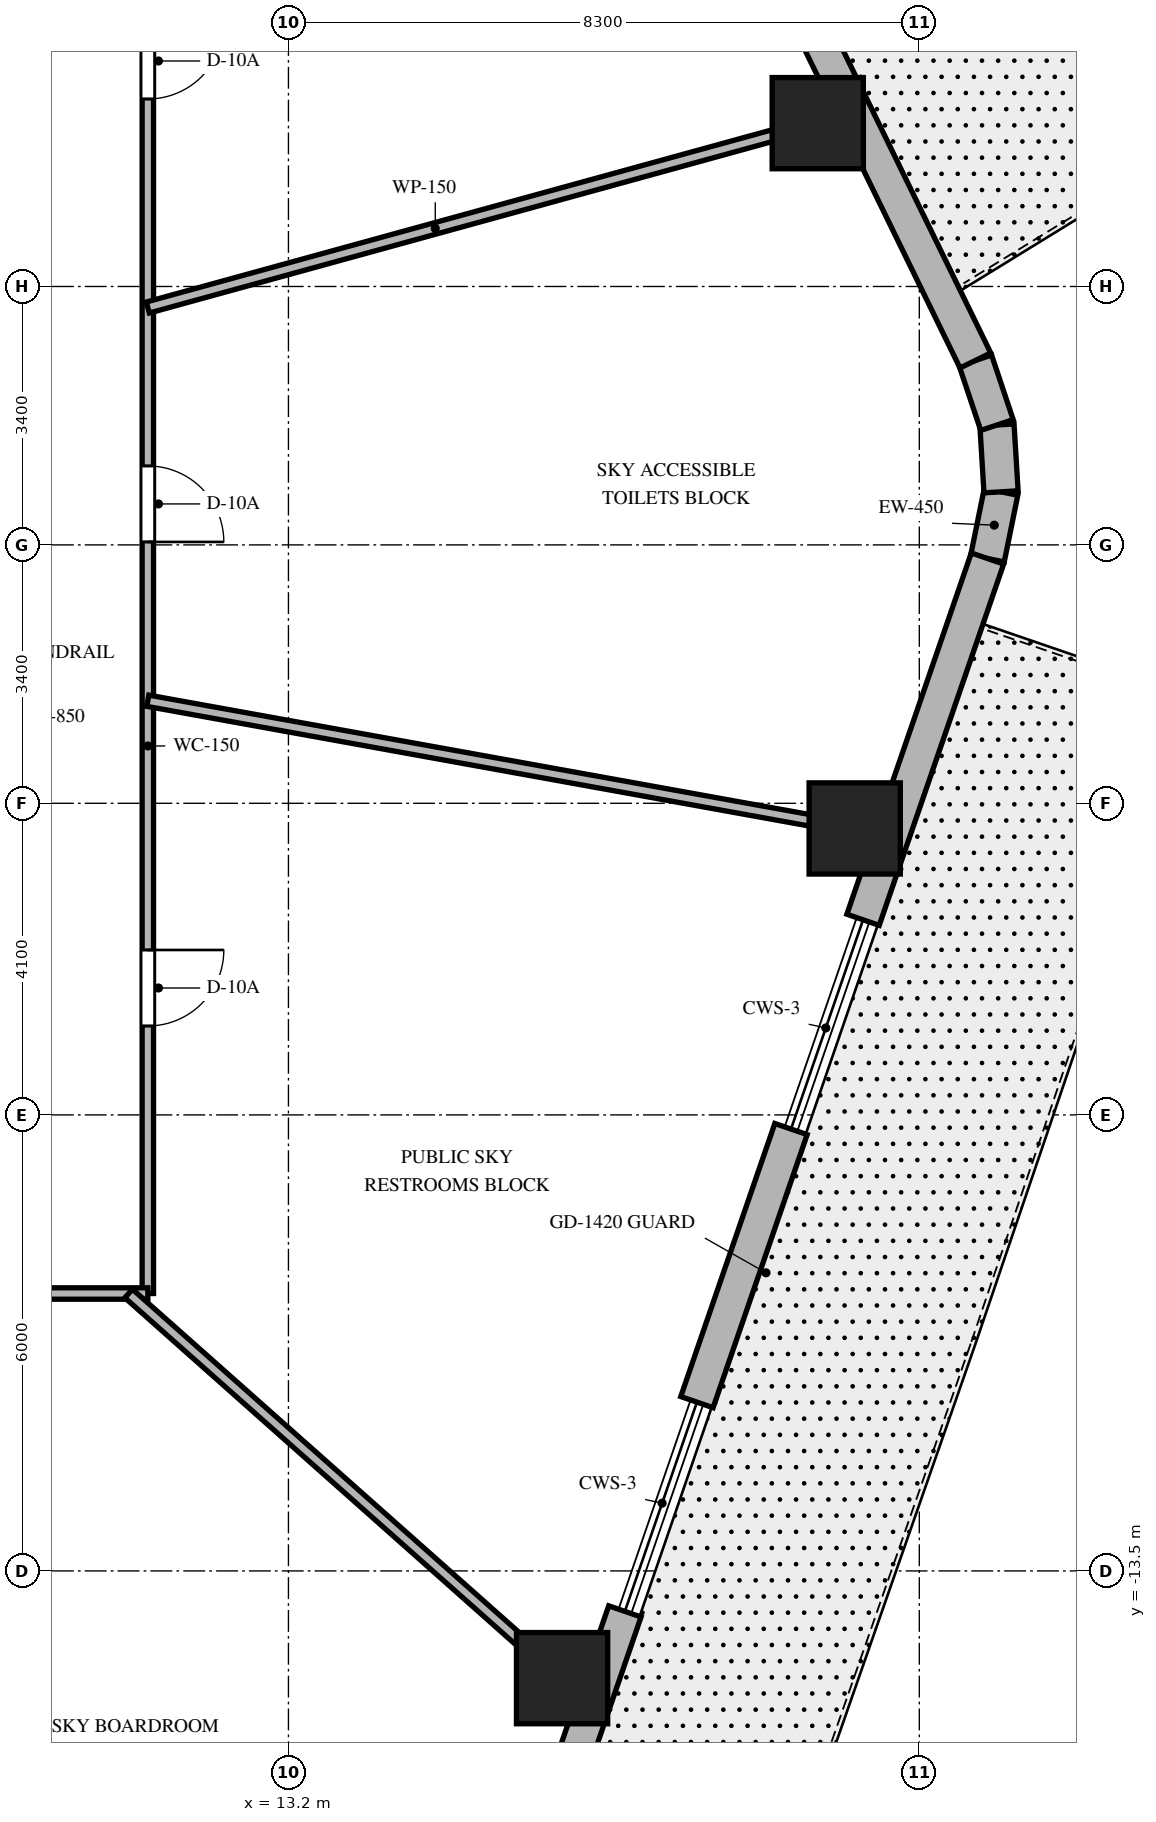
"""IFC4 building model, lengths in metres.
Left out: names, types, materials, properties, quantities, classifications, styles, units other than length and angle.
Written with IfcOpenShell. Run it as: python <this file> out.ifc"""

import sys

from ifc_helpers import new_model, si_unit, direction, frame, frame_2d, origin, origin_2d, place, context, subcontext, project, spatial, rectangle, extrude, element, fill, save


model = new_model("IFC4")
c1 = context("Model", 3, precision=1e-05, world=origin(), true_north=direction((0.0, 1.0)))
c2 = subcontext(c1, "Body", "Model", "MODEL_VIEW")
j1 = project(units=[si_unit("LENGTHUNIT", "METRE"), si_unit("PLANEANGLEUNIT", "RADIAN")], contexts=[c1])
p1 = place(None, origin())
s1 = spatial("IfcSite", under=j1, at=p1, CompositionType="ELEMENT")
p2 = place(p1, origin())
s2 = spatial("IfcBuilding", under=s1, at=p2, CompositionType="ELEMENT")
p3 = place(p2, frame((0.0, 0.0, 139.5)))
s3 = spatial("IfcBuildingStorey", under=s2, at=p3, CompositionType="ELEMENT", Elevation=139.5)
for number, where, z_axis, x_axis in (
    (1, (16.8, -14.911, 0.0), (0.0, 0.0, 1.0), (1.0, 0.0, 0.0)),
    (2, (20.65, -3.731, 0.0), (0.0, 0.0, 1.0), (1.0, 0.0, 0.0)),
    (3, (20.164, 5.549, 0.0), (0.0, 0.0, 1.0), (1.0, 0.0, 0.0)),
):
    element("IfcColumn", number, at=place(p3, frame(where, z_axis=z_axis, x_axis=x_axis)), inside=s3, PredefinedType="COLUMN", context=c2, shape_type="SweptSolid", body=[
        extrude(rectangle(XDim=1.2, YDim=1.2, at=origin_2d()), origin(), (0.0, 0.0, 1.0), 4.8),
    ])
p4 = place(p3, frame((22.397, -0.179, 0.0), z_axis=(0.0, 0.0, 1.0), x_axis=(0.199313589404, 0.979935759669, 0.0)))
e4 = element("IfcWall", 4, at=p4, inside=s3, PredefinedType="SOLIDWALL", context=c2, shape_type="SweptSolid", body=[
    extrude(rectangle(XDim=0.896, YDim=0.45, at=frame_2d((0.448, 0.0))), origin(), (0.0, 0.0, 1.0), 4.5),
])
p5 = place(p3, frame((22.575, 0.698, 0.0), z_axis=(0.0, 0.0, 1.0), x_axis=(-0.060980441946, 0.998138961117, 0.0)))
e5 = element("IfcWall", 5, at=p5, inside=s3, PredefinedType="SOLIDWALL", context=c2, shape_type="SweptSolid", body=[
    extrude(rectangle(XDim=0.881, YDim=0.45, at=frame_2d((0.44, 0.0))), origin(), (0.0, 0.0, 1.0), 4.5),
])
p6 = place(p3, frame((22.522, 1.577, 0.0), z_axis=(0.0, 0.0, 1.0), x_axis=(-0.317372694837, 0.948300887151, 0.0)))
e6 = element("IfcWall", 6, at=p6, inside=s3, PredefinedType="SOLIDWALL", context=c2, shape_type="SweptSolid", body=[
    extrude(rectangle(XDim=0.896, YDim=0.45, at=frame_2d((0.448, 0.0))), origin(), (0.0, 0.0, 1.0), 4.5),
])
p7 = place(p3, frame((15.992, -18.777, 0.0), z_axis=(0.0, 0.0, 1.0), x_axis=(0.325626313688, 0.945498547769, 0.0)))
e7 = element("IfcWall", 7, at=p7, inside=s3, PredefinedType="SOLIDWALL", context=c2, shape_type="SweptSolid", body=[
    extrude(rectangle(XDim=5.018, YDim=0.45, at=frame_2d((2.509, 0.0))), origin(), (0.0, 0.0, 1.0), 4.5),
])
p8 = place(p7, frame((2.009, 0.0, 0.0)))
e8 = element("IfcOpeningElement", 8, at=p8, cuts=e7, PredefinedType="OPENING", context=c2, shape_type="SweptSolid", body=[
    extrude(rectangle(XDim=1.0, YDim=2.15, at=frame_2d((0.5, 1.075))), frame((0.0, 0.235, 0.0), z_axis=(0.0, -1.0, 0.0), x_axis=(1.0, 0.0, 0.0)), (0.0, 0.0, 1.0), 0.47),
])
p9 = place(p3, frame((18.574, -11.279, 0.0), z_axis=(0.0, 0.0, 1.0), x_axis=(0.325598625093, 0.945508083169, 0.0)))
e9 = element("IfcWall", 9, at=p9, inside=s3, PredefinedType="SOLIDWALL", context=c2, shape_type="SweptSolid", body=[
    extrude(rectangle(XDim=3.8, YDim=0.45, at=frame_2d((1.9, 0.0))), origin(), (0.0, 0.0, 1.0), 4.5),
])
p10 = place(p3, frame((20.76, -4.933, 0.0), z_axis=(0.0, 0.0, 1.0), x_axis=(0.325594073587, 0.94550965053, 0.0)))
e10 = element("IfcWall", 10, at=p10, inside=s3, PredefinedType="SOLIDWALL", context=c2, shape_type="SweptSolid", body=[
    extrude(rectangle(XDim=5.028, YDim=0.45, at=frame_2d((2.514, 0.0))), origin(), (0.0, 0.0, 1.0), 4.5),
])
p11 = place(p3, frame((22.238, 2.427, 0.0), z_axis=(0.0, 0.0, 1.0), x_axis=(-0.438370693728, 0.898794267272, 0.0)))
e11 = element("IfcWall", 11, at=p11, inside=s3, PredefinedType="SOLIDWALL", context=c2, shape_type="SweptSolid", body=[
    extrude(rectangle(XDim=4.816, YDim=0.45, at=frame_2d((2.408, 0.0))), origin(), (0.0, 0.0, 1.0), 4.5),
])
p12 = place(p3, frame((11.35, 9.85, 0.0), z_axis=(0.0, 0.0, 1.0), x_axis=(0.0, -1.0, 0.0)))
e12 = element("IfcWall", 12, at=p12, inside=s3, PredefinedType="PARTITIONING", context=c2, shape_type="SweptSolid", body=[
    extrude(rectangle(XDim=19.7, YDim=0.15, at=frame_2d((9.85, 0.0))), origin(), (0.0, 0.0, 1.0), 2.69),
])
p13 = place(p12, frame((2.983, 0.0, 0.0)))
e13 = element("IfcOpeningElement", 13, at=p13, cuts=e12, PredefinedType="OPENING", context=c2, shape_type="SweptSolid", body=[
    extrude(rectangle(XDim=1.0, YDim=2.03, at=frame_2d((0.5, 1.015))), frame((0.0, 0.085, 0.0), z_axis=(0.0, -1.0, 0.0), x_axis=(1.0, 0.0, 0.0)), (0.0, 0.0, 1.0), 0.17),
])
p14 = place(p12, frame((15.18, 0.0, 0.0)))
e14 = element("IfcOpeningElement", 14, at=p14, cuts=e12, PredefinedType="OPENING", context=c2, shape_type="SweptSolid", body=[
    extrude(rectangle(XDim=1.0, YDim=2.03, at=frame_2d((0.5, 1.015))), frame((0.0, 0.085, 0.0), z_axis=(0.0, -1.0, 0.0), x_axis=(1.0, 0.0, 0.0)), (0.0, 0.0, 1.0), 0.17),
])
p15 = place(p12, frame((8.811, 0.0, 0.0)))
e15 = element("IfcOpeningElement", 15, at=p15, cuts=e12, PredefinedType="OPENING", context=c2, shape_type="SweptSolid", body=[
    extrude(rectangle(XDim=1.0, YDim=2.03, at=frame_2d((0.5, 1.015))), frame((0.0, 0.085, 0.0), z_axis=(0.0, -1.0, 0.0), x_axis=(1.0, 0.0, 0.0)), (0.0, 0.0, 1.0), 0.17),
])
p16 = place(p3, frame((11.35, -9.85, 0.0), z_axis=(0.0, 0.0, 1.0), x_axis=(-1.0, 0.0, 0.0)))
e16 = element("IfcWall", 16, at=p16, inside=s3, PredefinedType="PARTITIONING", context=c2, shape_type="SweptSolid", body=[
    extrude(rectangle(XDim=22.7, YDim=0.15, at=frame_2d((11.35, 0.0))), origin(), (0.0, 0.0, 1.0), 2.69),
])
p17 = place(p16, frame((17.212, 0.0, 0.0)))
e17 = element("IfcOpeningElement", 17, at=p17, cuts=e16, PredefinedType="OPENING", context=c2, shape_type="SweptSolid", body=[
    extrude(rectangle(XDim=1.0, YDim=2.03, at=frame_2d((0.5, 1.015))), frame((0.0, 0.085, 0.0), z_axis=(0.0, -1.0, 0.0), x_axis=(1.0, 0.0, 0.0)), (0.0, 0.0, 1.0), 0.17),
])
p18 = place(p16, frame((10.425, 0.0, 0.0)))
e18 = element("IfcOpeningElement", 18, at=p18, cuts=e16, PredefinedType="OPENING", context=c2, shape_type="SweptSolid", body=[
    extrude(rectangle(XDim=1.0, YDim=2.03, at=frame_2d((0.5, 1.015))), frame((0.0, 0.085, 0.0), z_axis=(0.0, -1.0, 0.0), x_axis=(1.0, 0.0, 0.0)), (0.0, 0.0, 1.0), 0.17),
])
p19 = place(p16, frame((3.374, 0.0, 0.0)))
e19 = element("IfcOpeningElement", 19, at=p19, cuts=e16, PredefinedType="OPENING", context=c2, shape_type="SweptSolid", body=[
    extrude(rectangle(XDim=1.0, YDim=2.03, at=frame_2d((0.5, 1.015))), frame((0.0, 0.085, 0.0), z_axis=(0.0, -1.0, 0.0), x_axis=(1.0, 0.0, 0.0)), (0.0, 0.0, 1.0), 0.17),
])
p20 = place(p3, frame((11.35, 3.123, 0.0), z_axis=(0.0, 0.0, 1.0), x_axis=(0.964151983214, 0.265350623261, 0.0)))
e20 = element("IfcWall", 20, at=p20, inside=s3, PredefinedType="PARTITIONING", context=c2, shape_type="SweptSolid", body=[
    extrude(rectangle(XDim=9.645, YDim=0.15, at=frame_2d((4.823, 0.0))), origin(), (0.0, 0.0, 1.0), 2.69),
])
p21 = place(p3, frame((11.098, -9.85, 0.0), z_axis=(0.0, 0.0, 1.0), x_axis=(0.747904295103, -0.663806572253, 0.0)))
e21 = element("IfcWall", 21, at=p21, inside=s3, PredefinedType="PARTITIONING", context=c2, shape_type="SweptSolid", body=[
    extrude(rectangle(XDim=8.16, YDim=0.15, at=frame_2d((4.08, 0.0))), origin(), (0.0, 0.0, 1.0), 2.69),
])
p22 = place(p3, frame((11.35, -2.051, 0.0), z_axis=(0.0, 0.0, 1.0), x_axis=(0.984068313063, -0.177790762484, 0.0)))
e22 = element("IfcWall", 22, at=p22, inside=s3, PredefinedType="PARTITIONING", context=c2, shape_type="SweptSolid", body=[
    extrude(rectangle(XDim=9.951, YDim=0.15, at=frame_2d((4.976, 0.0))), origin(), (0.0, 0.0, 1.0), 2.69),
])
p23 = place(p13, origin())
e23 = element("IfcDoor", 23, at=p23, inside=s3, OperationType="SINGLE_SWING_LEFT", PredefinedType="DOOR", context=c2, shape_type="SweptSolid", body=[
    extrude(rectangle(XDim=1.0, YDim=2.03, at=frame_2d((0.5, 1.015))), frame((0.0, 0.025, 0.0), z_axis=(0.0, -1.0, 0.0), x_axis=(1.0, 0.0, 0.0)), (0.0, 0.0, 1.0), 0.05),
])
fill(e13, e23)
p24 = place(p14, origin())
e24 = element("IfcDoor", 24, at=p24, inside=s3, OperationType="SINGLE_SWING_LEFT", PredefinedType="DOOR", context=c2, shape_type="SweptSolid", body=[
    extrude(rectangle(XDim=1.0, YDim=2.03, at=frame_2d((0.5, 1.015))), frame((0.0, 0.025, 0.0), z_axis=(0.0, -1.0, 0.0), x_axis=(1.0, 0.0, 0.0)), (0.0, 0.0, 1.0), 0.05),
])
fill(e14, e24)
p25 = place(p15, origin())
e25 = element("IfcDoor", 25, at=p25, inside=s3, OperationType="SINGLE_SWING_RIGHT", PredefinedType="DOOR", context=c2, shape_type="SweptSolid", body=[
    extrude(rectangle(XDim=1.0, YDim=2.03, at=frame_2d((0.5, 1.015))), frame((0.0, 0.025, 0.0), z_axis=(0.0, -1.0, 0.0), x_axis=(1.0, 0.0, 0.0)), (0.0, 0.0, 1.0), 0.05),
])
fill(e15, e25)
save(model, sys.argv[1])
